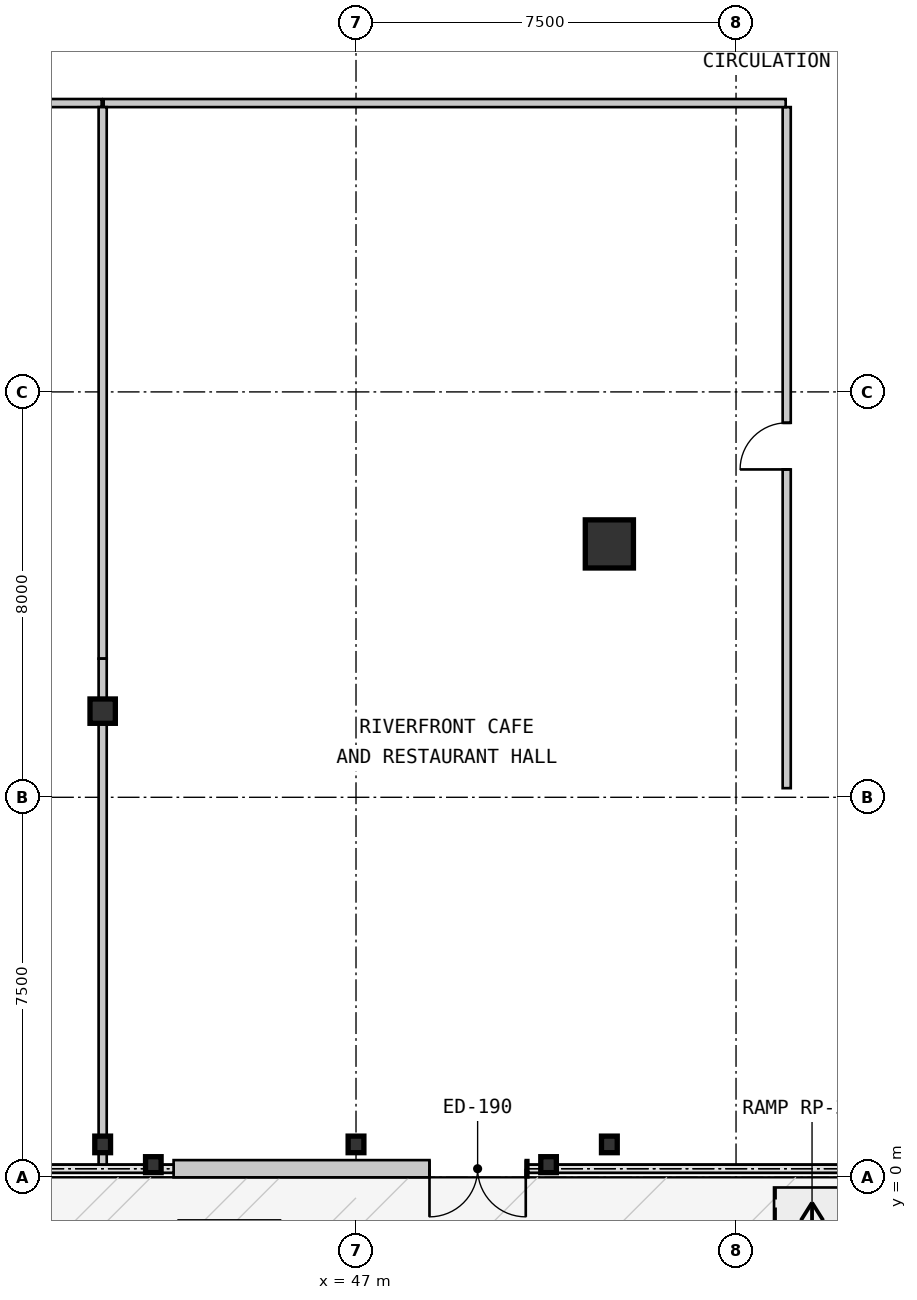
"""IFC4 building model, lengths in metres.
Left out: names, types, materials, properties, quantities, classifications, styles, units other than length and angle.
Written with IfcOpenShell. Run it as: python <this file> out.ifc"""

import sys

from ifc_helpers import new_model, si_unit, direction, frame, frame_2d, origin, origin_2d, place, context, subcontext, project, spatial, rectangle, i_section, extrude, source, transform, mapped, element, fill, save


model = new_model("IFC4")
c1 = context("Model", 3, precision=1e-05, world=origin(), true_north=direction((0.0, 1.0)))
c2 = subcontext(c1, "Body", "Model", "MODEL_VIEW")
j1 = project(units=[si_unit("LENGTHUNIT", "METRE"), si_unit("PLANEANGLEUNIT", "RADIAN")], contexts=[c1])
p1 = place(None, origin())
s1 = spatial("IfcSite", under=j1, at=p1, CompositionType="ELEMENT")
p2 = place(p1, origin())
s2 = spatial("IfcBuilding", under=s1, at=p2, CompositionType="ELEMENT")
p3 = place(p2, origin())
s3 = spatial("IfcBuildingStorey", under=s2, at=p3, CompositionType="ELEMENT", Elevation=0.0)
m1 = source(origin(), c2, "Body", "SweptSolid", [
    extrude(i_section(OverallWidth=0.5, OverallDepth=0.48, WebThickness=0.028, FlangeThickness=0.044, at=origin_2d()), origin(), (0.0, 0.0, 1.0), 4.55),
])
p4 = place(p3, frame((42.0, 9.2, 0.0), z_axis=(0.0, 0.0, 1.0), x_axis=(1.0, 0.0, 0.0)))
e1 = element("IfcColumn", 1, at=p4, inside=s3, PredefinedType="COLUMN", context=c2, shape_type="MappedRepresentation", body=[
    mapped(m1, transform((0.0, 0.0, 0.0), scale=1.0)),
])
m2 = source(origin(), c2, "Body", "SweptSolid", [
    extrude(rectangle(XDim=0.95, YDim=0.95, at=origin_2d()), origin(), (0.0, 0.0, 1.0), 4.55),
])
p5 = place(p3, frame((52.0, 12.5, 0.0), z_axis=(0.0, 0.0, 1.0), x_axis=(1.0, 0.0, 0.0)))
e2 = element("IfcColumn", 2, at=p5, inside=s3, PredefinedType="COLUMN", context=c2, shape_type="MappedRepresentation", body=[
    mapped(m2, transform((0.0, 0.0, 0.0), scale=1.0)),
])
m3 = source(origin(), c2, "Body", "SweptSolid", [
    extrude(i_section(OverallWidth=0.311, OverallDepth=0.327, WebThickness=0.016, FlangeThickness=0.025, at=origin_2d()), origin(), (0.0, 0.0, 1.0), 4.55),
])
for number, where, z_axis, x_axis in (
    (3, (42.0, 0.65, 0.0), (0.0, 0.0, 1.0), (1.0, 0.0, 0.0)),
    (4, (47.0, 0.65, 0.0), (0.0, 0.0, 1.0), (1.0, 0.0, 0.0)),
    (5, (52.0, 0.65, 0.0), (0.0, 0.0, 1.0), (1.0, 0.0, 0.0)),
):
    element("IfcColumn", number, at=place(p3, frame(where, z_axis=z_axis, x_axis=x_axis)), inside=s3, PredefinedType="COLUMN", context=c2, shape_type="MappedRepresentation", body=[
        mapped(m3, transform((0.0, 0.0, 0.0), scale=1.0)),
    ])
m4 = source(origin(), c2, "Body", "SweptSolid", [
    extrude(i_section(OverallWidth=0.307, OverallDepth=0.315, WebThickness=0.012, FlangeThickness=0.019, at=origin_2d()), origin(), (0.0, 0.0, 1.0), 4.55),
])
for number, where, z_axis, x_axis in (
    (6, (43.0, 0.25, 0.0), (0.0, 0.0, 1.0), (1.0, 0.0, 0.0)),
    (7, (50.8, 0.25, 0.0), (0.0, 0.0, 1.0), (1.0, 0.0, 0.0)),
):
    element("IfcColumn", number, at=place(p3, frame(where, z_axis=z_axis, x_axis=x_axis)), inside=s3, PredefinedType="PILASTER", context=c2, shape_type="MappedRepresentation", body=[
        mapped(m4, transform((0.0, 0.0, 0.0), scale=1.0)),
    ])
m5 = source(origin(), c2, "Body", "SweptSolid", [
    extrude(rectangle(XDim=7.0, YDim=0.34, at=frame_2d((3.5, 0.0))), origin(), (0.0, 0.0, 1.0), 4.29),
])
p6 = place(p3, frame((43.4, 0.17, 0.0), z_axis=(0.0, 0.0, 1.0), x_axis=(1.0, 0.0, 0.0)))
e8 = element("IfcWall", 8, at=p6, inside=s3, PredefinedType="SOLIDWALL", context=c2, shape_type="MappedRepresentation", body=[
    mapped(m5, transform((0.0, 0.0, 0.0), scale=1.0)),
])
m6 = source(origin(), c2, "Body", "SweptSolid", [
    extrude(rectangle(XDim=1.9, YDim=2.4, at=frame_2d((0.95, 1.2))), frame((0.0, 0.18, 0.0), z_axis=(0.0, -1.0, 0.0), x_axis=(1.0, 0.0, 0.0)), (0.0, 0.0, 1.0), 0.36),
])
p7 = place(p6, frame((5.05, 0.0, 0.0)))
e9 = element("IfcOpeningElement", 9, at=p7, cuts=e8, PredefinedType="OPENING", context=c2, shape_type="MappedRepresentation", body=[
    mapped(m6, transform((0.0, 0.0, 0.0), scale=1.0)),
])
m7 = source(origin(), c2, "Body", "SweptSolid", [
    extrude(rectangle(XDim=23.959, YDim=0.16, at=frame_2d((11.98, 0.0))), origin(), (0.0, 0.0, 1.0), 4.29),
])
p8 = place(p3, frame((41.98, 21.2, 0.0), z_axis=(0.0, 0.0, 1.0), x_axis=(-1.0, 0.0, 0.0)))
e10 = element("IfcWall", 10, at=p8, inside=s3, PredefinedType="PARTITIONING", context=c2, shape_type="MappedRepresentation", body=[
    mapped(m7, transform((0.0, 0.0, 0.0), scale=1.0)),
])
m8 = source(origin(), c2, "Body", "SweptSolid", [
    extrude(rectangle(XDim=0.92, YDim=2.1, at=frame_2d((0.46, 1.05))), frame((0.0, 0.09, 0.0), z_axis=(0.0, -1.0, 0.0), x_axis=(1.0, 0.0, 0.0)), (0.0, 0.0, 1.0), 0.18),
])
p9 = place(p8, frame((11.52, 0.0, 0.0)))
e11 = element("IfcOpeningElement", 11, at=p9, cuts=e10, PredefinedType="OPENING", context=c2, shape_type="MappedRepresentation", body=[
    mapped(m8, transform((0.0, 0.0, 0.0), scale=1.0)),
])
m9 = source(origin(), c2, "Body", "SweptSolid", [
    extrude(rectangle(XDim=13.44, YDim=0.16, at=frame_2d((6.72, 0.0))), origin(), (0.0, 0.0, 1.0), 4.29),
])
p10 = place(p3, frame((55.5, 7.68, 0.0), z_axis=(0.0, 0.0, 1.0), x_axis=(0.0, 1.0, 0.0)))
e12 = element("IfcWall", 12, at=p10, inside=s3, PredefinedType="PARTITIONING", context=c2, shape_type="MappedRepresentation", body=[
    mapped(m9, transform((0.0, 0.0, 0.0), scale=1.0)),
])
p11 = place(p10, frame((6.29, 0.0, 0.0)))
e13 = element("IfcOpeningElement", 13, at=p11, cuts=e12, PredefinedType="OPENING", context=c2, shape_type="MappedRepresentation", body=[
    mapped(m8, transform((0.0, 0.0, 0.0), scale=1.0)),
])
m10 = source(origin(), c2, "Body", "SweptSolid", [
    extrude(rectangle(XDim=13.459, YDim=0.16, at=frame_2d((6.73, 0.0))), origin(), (0.0, 0.0, 1.0), 4.29),
])
p12 = place(p3, frame((55.48, 21.2, 0.0), z_axis=(0.0, 0.0, 1.0), x_axis=(-1.0, 0.0, 0.0)))
e14 = element("IfcWall", 14, at=p12, inside=s3, PredefinedType="PARTITIONING", context=c2, shape_type="MappedRepresentation", body=[
    mapped(m10, transform((0.0, 0.0, 0.0), scale=1.0)),
])
m11 = source(origin(), c2, "Body", "SweptSolid", [
    extrude(rectangle(XDim=10.884, YDim=0.16, at=frame_2d((5.442, 0.0))), origin(), (0.0, 0.0, 1.0), 4.29),
])
p13 = place(p3, frame((42.0, 21.12, 0.0), z_axis=(0.0, 0.0, 1.0), x_axis=(0.0, -1.0, 0.0)))
e15 = element("IfcWall", 15, at=p13, inside=s3, PredefinedType="PARTITIONING", context=c2, shape_type="MappedRepresentation", body=[
    mapped(m11, transform((0.0, 0.0, 0.0), scale=1.0)),
])
m12 = source(origin(), c2, "Body", "SweptSolid", [
    extrude(rectangle(XDim=1.051, YDim=0.16, at=frame_2d((0.526, 0.0))), origin(), (0.0, 0.0, 1.0), 3.688),
])
p14 = place(p3, frame((42.0, 10.236, 0.0), z_axis=(0.0, 0.0, 1.0), x_axis=(0.0, -1.0, 0.0)))
e16 = element("IfcWall", 16, at=p14, inside=s3, PredefinedType="PARTITIONING", context=c2, shape_type="MappedRepresentation", body=[
    mapped(m12, transform((0.0, 0.0, 0.0), scale=1.0)),
])
m13 = source(origin(), c2, "Body", "SweptSolid", [
    extrude(rectangle(XDim=8.535, YDim=0.16, at=frame_2d((4.268, 0.0))), origin(), (0.0, 0.0, 1.0), 3.757),
])
p15 = place(p3, frame((42.0, 9.185, 0.0), z_axis=(0.0, 0.0, 1.0), x_axis=(0.0, -1.0, 0.0)))
e17 = element("IfcWall", 17, at=p15, inside=s3, PredefinedType="PARTITIONING", context=c2, shape_type="MappedRepresentation", body=[
    mapped(m13, transform((0.0, 0.0, 0.0), scale=1.0)),
])
m14 = source(origin(), c2, "Body", "SweptSolid", [
    extrude(rectangle(XDim=0.42, YDim=0.16, at=frame_2d((0.21, 0.0))), origin(), (0.0, 0.0, 1.0), 4.29),
])
p16 = place(p3, frame((42.0, 0.65, 0.0), z_axis=(0.0, 0.0, 1.0), x_axis=(0.0, -1.0, 0.0)))
e18 = element("IfcWall", 18, at=p16, inside=s3, PredefinedType="PARTITIONING", context=c2, shape_type="MappedRepresentation", body=[
    mapped(m14, transform((0.0, 0.0, 0.0), scale=1.0)),
])
m15 = source(origin(), c2, "Body", "SweptSolid", [
    extrude(rectangle(XDim=1.9, YDim=2.4, at=frame_2d((0.95, 1.2))), frame((0.0, 0.025, 0.0), z_axis=(0.0, -1.0, 0.0), x_axis=(1.0, 0.0, 0.0)), (0.0, 0.0, 1.0), 0.05),
])
p17 = place(p7, frame((1.9, 0.0, 0.0), z_axis=(0.0, 0.0, 1.0), x_axis=(-1.0, 0.0, 0.0)))
e19 = element("IfcDoor", 19, at=p17, inside=s3, OperationType="DOUBLE_DOOR_SINGLE_SWING", PredefinedType="DOOR", context=c2, shape_type="MappedRepresentation", body=[
    mapped(m15, transform((0.0, 0.0, 0.0), scale=1.0)),
])
fill(e9, e19)
p18 = place(p3, frame((0.0, 0.0, 3.72)))
p19 = place(p18, frame((44.5, -1.45, 0.13)))
e20 = element("IfcWindow", 20, at=p19, inside=s3, PartitioningType="SINGLE_PANEL", PredefinedType="SKYLIGHT", context=c2, shape_type="SweptSolid", body=[
    extrude(rectangle(XDim=2.0, YDim=1.2, at=origin_2d()), origin(), (0.0, 0.0, 1.0), 0.05),
])
m16 = source(origin(), c2, "Body", "SweptSolid", [
    extrude(rectangle(XDim=0.92, YDim=2.1, at=frame_2d((0.46, 1.05))), frame((0.0, 0.025, 0.0), z_axis=(0.0, -1.0, 0.0), x_axis=(1.0, 0.0, 0.0)), (0.0, 0.0, 1.0), 0.05),
])
p20 = place(p11, origin())
e21 = element("IfcDoor", 21, at=p20, inside=s3, OperationType="SINGLE_SWING_LEFT", PredefinedType="DOOR", context=c2, shape_type="MappedRepresentation", body=[
    mapped(m16, transform((0.0, 0.0, 0.0), scale=1.0)),
])
fill(e13, e21)
save(model, sys.argv[1])
